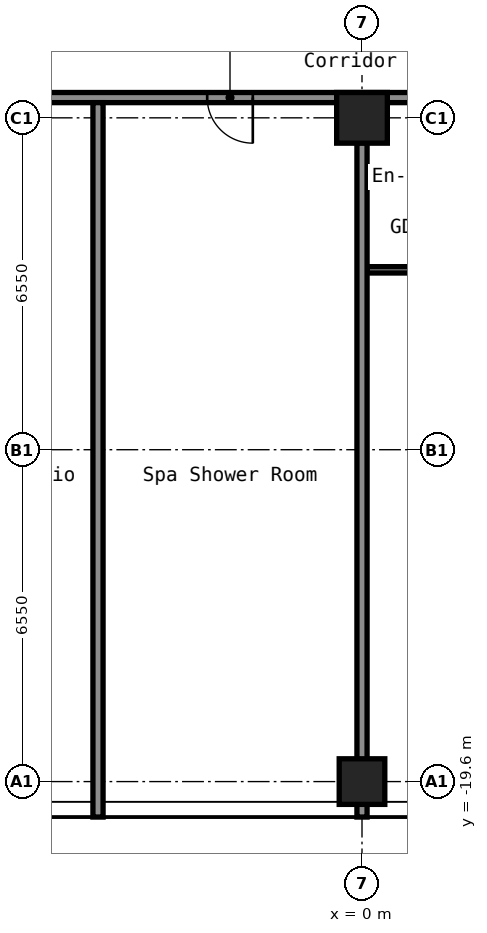
"""IFC4 building model, lengths in metres.
Left out: names, types, materials, properties, quantities, classifications, styles, units other than length and angle.
Written with IfcOpenShell. Run it as: python <this file> out.ifc"""

import sys

from ifc_helpers import new_model, si_unit, direction, frame, frame_2d, origin, origin_2d, place, context, subcontext, project, spatial, rectangle, hollow_rectangle, extrude, element, fill, save


model = new_model("IFC4")
c1 = context("Model", 3, precision=1e-05, world=origin(), true_north=direction((0.0, 1.0)))
c2 = subcontext(c1, "Body", "Model", "MODEL_VIEW")
j1 = project(units=[si_unit("LENGTHUNIT", "METRE"), si_unit("PLANEANGLEUNIT", "RADIAN")], contexts=[c1])
p1 = place(None, origin())
s1 = spatial("IfcSite", under=j1, at=p1, CompositionType="ELEMENT")
p2 = place(p1, origin())
s2 = spatial("IfcBuilding", under=s1, at=p2, CompositionType="ELEMENT")
p3 = place(p2, frame((0.0, 0.0, 35.8)))
s3 = spatial("IfcBuildingStorey", under=s2, at=p3, CompositionType="ELEMENT", Elevation=35.8)
p4 = place(p3, frame((0.0, -19.6, 0.0), z_axis=(0.0, 0.0, 1.0), x_axis=(1.0, 0.0, 0.0)))
e1 = element("IfcColumn", 1, at=p4, inside=s3, PredefinedType="COLUMN", context=c2, shape_type="SweptSolid", body=[
    extrude(hollow_rectangle(XDim=0.9, YDim=0.9, WallThickness=0.036, at=origin_2d()), origin(), (0.0, 0.0, 1.0), 2.8),
])
p5 = place(p3, frame((0.0, -6.5, 0.0), z_axis=(0.0, 0.0, 1.0), x_axis=(1.0, 0.0, 0.0)))
e2 = element("IfcColumn", 2, at=p5, inside=s3, PredefinedType="COLUMN", context=c2, shape_type="SweptSolid", body=[
    extrude(hollow_rectangle(XDim=1.0, YDim=1.0, WallThickness=0.04, at=origin_2d()), origin(), (0.0, 0.0, 1.0), 2.8),
])
p6 = place(p3, frame((0.1, -9.5, 0.0), z_axis=(0.0, 0.0, 1.0), x_axis=(1.0, 0.0, 0.0)))
e3 = element("IfcWall", 3, at=p6, inside=s3, PredefinedType="PARTITIONING", context=c2, shape_type="SweptSolid", body=[
    extrude(rectangle(XDim=3.237, YDim=0.125, at=frame_2d((1.619, 0.0))), origin(), (0.0, 0.0, 1.0), 2.8),
])
p7 = place(p6, frame((1.2, 0.0, 0.0)))
e4 = element("IfcOpeningElement", 4, at=p7, cuts=e3, PredefinedType="OPENING", context=c2, shape_type="SweptSolid", body=[
    extrude(rectangle(XDim=0.8, YDim=2.1, at=frame_2d((0.4, 1.05))), frame((0.0, 0.073, 0.0), z_axis=(0.0, -1.0, 0.0), x_axis=(1.0, 0.0, 0.0)), (0.0, 0.0, 1.0), 0.145),
])
p8 = place(p3, frame((-16.8, -6.1, 0.0), z_axis=(0.0, 0.0, 1.0), x_axis=(1.0, 0.0, 0.0)))
e5 = element("IfcWall", 5, at=p8, inside=s3, PredefinedType="PARTITIONING", context=c2, shape_type="SweptSolid", body=[
    extrude(rectangle(XDim=33.6, YDim=0.2, at=frame_2d((16.8, 0.0))), origin(), (0.0, 0.0, 1.0), 2.8),
])
p9 = place(p8, frame((5.4, 0.0, 0.0)))
e6 = element("IfcOpeningElement", 6, at=p9, cuts=e5, PredefinedType="OPENING", context=c2, shape_type="SweptSolid", body=[
    extrude(rectangle(XDim=1.0, YDim=2.1, at=frame_2d((0.5, 1.05))), frame((0.0, 0.11, 0.0), z_axis=(0.0, -1.0, 0.0), x_axis=(1.0, 0.0, 0.0)), (0.0, 0.0, 1.0), 0.22),
])
p10 = place(p8, frame((9.545, 0.0, 0.0)))
e7 = element("IfcOpeningElement", 7, at=p10, cuts=e5, PredefinedType="OPENING", context=c2, shape_type="SweptSolid", body=[
    extrude(rectangle(XDim=0.9, YDim=2.1, at=frame_2d((0.45, 1.05))), frame((0.0, 0.11, 0.0), z_axis=(0.0, -1.0, 0.0), x_axis=(1.0, 0.0, 0.0)), (0.0, 0.0, 1.0), 0.22),
])
p11 = place(p8, frame((13.745, 0.0, 0.0)))
e8 = element("IfcOpeningElement", 8, at=p11, cuts=e5, PredefinedType="OPENING", context=c2, shape_type="SweptSolid", body=[
    extrude(rectangle(XDim=0.9, YDim=2.1, at=frame_2d((0.45, 1.05))), frame((0.0, 0.11, 0.0), z_axis=(0.0, -1.0, 0.0), x_axis=(1.0, 0.0, 0.0)), (0.0, 0.0, 1.0), 0.22),
])
p12 = place(p8, frame((22.2, 0.0, 0.0)))
e9 = element("IfcOpeningElement", 9, at=p12, cuts=e5, PredefinedType="OPENING", context=c2, shape_type="SweptSolid", body=[
    extrude(rectangle(XDim=1.0, YDim=2.1, at=frame_2d((0.5, 1.05))), frame((0.0, 0.11, 0.0), z_axis=(0.0, -1.0, 0.0), x_axis=(1.0, 0.0, 0.0)), (0.0, 0.0, 1.0), 0.22),
])
p13 = place(p8, frame((30.6, 0.0, 0.0)))
e10 = element("IfcOpeningElement", 10, at=p13, cuts=e5, PredefinedType="OPENING", context=c2, shape_type="SweptSolid", body=[
    extrude(rectangle(XDim=1.0, YDim=2.1, at=frame_2d((0.5, 1.05))), frame((0.0, 0.11, 0.0), z_axis=(0.0, -1.0, 0.0), x_axis=(1.0, 0.0, 0.0)), (0.0, 0.0, 1.0), 0.22),
])
p14 = place(p3, frame((-5.21, -20.3, 0.0), z_axis=(0.0, 0.0, 1.0), x_axis=(0.0, 1.0, 0.0)))
e11 = element("IfcWall", 11, at=p14, inside=s3, PredefinedType="PARTITIONING", context=c2, shape_type="SweptSolid", body=[
    extrude(rectangle(XDim=14.1, YDim=0.2, at=frame_2d((7.05, 0.0))), origin(), (0.0, 0.0, 1.0), 2.8),
])
p15 = place(p3, frame((0.0, -20.3, 0.0), z_axis=(0.0, 0.0, 1.0), x_axis=(0.0, 1.0, 0.0)))
e12 = element("IfcWall", 12, at=p15, inside=s3, PredefinedType="PARTITIONING", context=c2, shape_type="SweptSolid", body=[
    extrude(rectangle(XDim=13.31, YDim=0.2, at=frame_2d((6.655, 0.0))), origin(), (0.0, 0.0, 1.0), 2.8),
])
p16 = place(p11, origin())
e13 = element("IfcDoor", 13, at=p16, inside=s3, OperationType="SINGLE_SWING_RIGHT", PredefinedType="DOOR", context=c2, shape_type="SweptSolid", body=[
    extrude(rectangle(XDim=0.9, YDim=2.1, at=frame_2d((0.45, 1.05))), frame((0.0, 0.025, 0.0), z_axis=(0.0, -1.0, 0.0), x_axis=(1.0, 0.0, 0.0)), (0.0, 0.0, 1.0), 0.05),
])
fill(e8, e13)
save(model, sys.argv[1])
